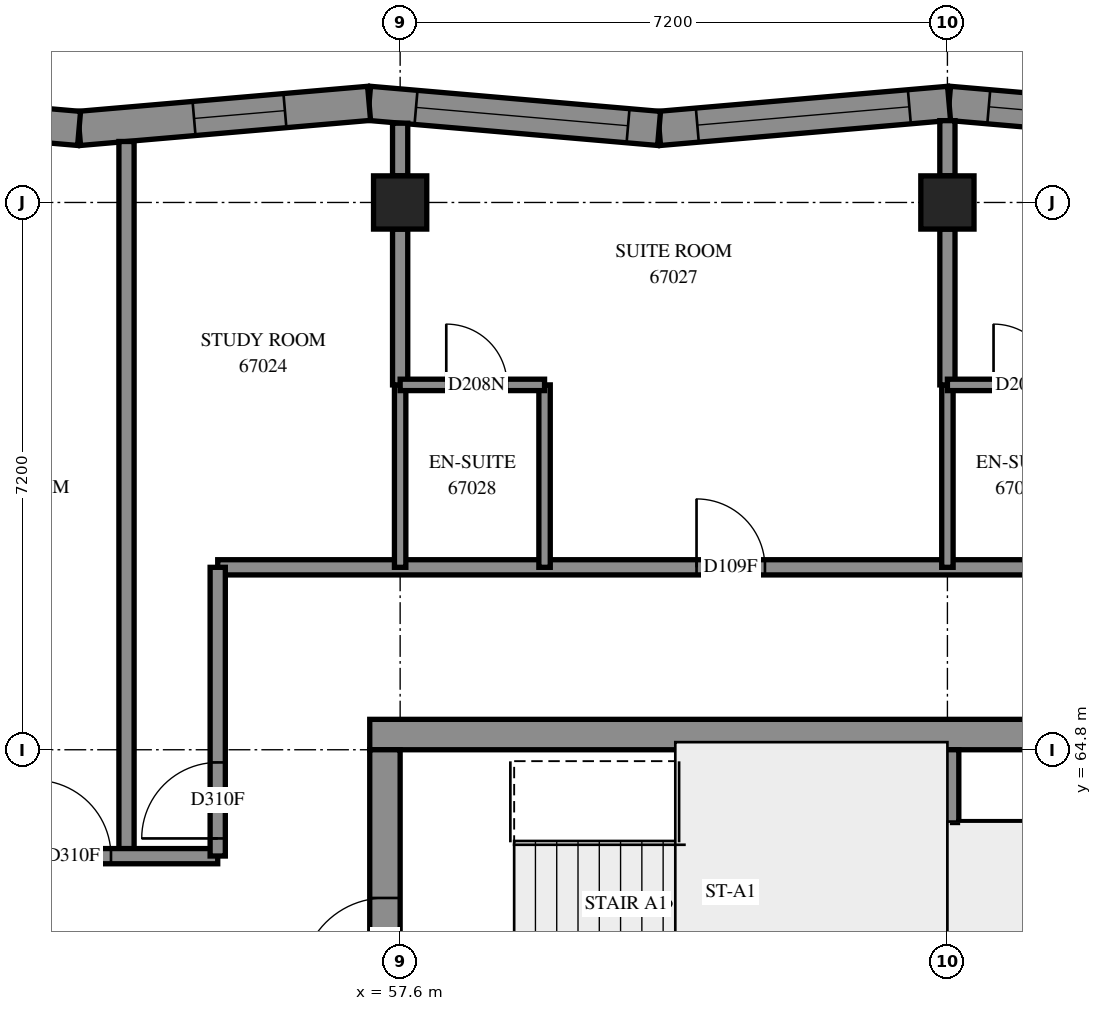
"""IFC4 building model, lengths in metres.
Left out: names, types, materials, properties, quantities, classifications, styles, units other than length and angle.
Written with IfcOpenShell. Run it as: python <this file> out.ifc"""

import sys

from ifc_helpers import new_model, si_unit, direction, frame, frame_2d, origin, origin_2d, place, context, subcontext, project, spatial, polyline, rectangle, outline, extrude, element, fill, save


model = new_model("IFC4")
c1 = context("Model", 3, precision=1e-05, world=origin(), true_north=direction((0.0, 1.0)))
c2 = subcontext(c1, "Body", "Model", "MODEL_VIEW")
j1 = project(units=[si_unit("LENGTHUNIT", "METRE"), si_unit("PLANEANGLEUNIT", "RADIAN")], contexts=[c1])
p1 = place(None, origin())
s1 = spatial("IfcSite", under=j1, at=p1, CompositionType="ELEMENT")
p2 = place(p1, origin())
s2 = spatial("IfcBuilding", under=s1, at=p2, CompositionType="ELEMENT")
p3 = place(p2, frame((0.0, 0.0, 247.2)))
s3 = spatial("IfcBuildingStorey", under=s2, at=p3, CompositionType="ELEMENT", Elevation=247.2)
for number, where, z_axis, x_axis in (
    (1, (57.6, 72.0, 0.0), (0.0, 0.0, 1.0), (1.0, 0.0, 0.0)),
    (2, (64.8, 72.0, 0.0), (0.0, 0.0, 1.0), (1.0, 0.0, 0.0)),
):
    element("IfcColumn", number, at=place(p3, frame(where, z_axis=z_axis, x_axis=x_axis)), inside=s3, PredefinedType="COLUMN", context=c2, shape_type="SweptSolid", body=[
        extrude(rectangle(XDim=0.7, YDim=0.7, at=origin_2d()), origin(), (0.0, 0.0, 1.0), 3.1),
    ])
p4 = place(p3, frame((57.2, 65.0, -0.3), z_axis=(0.0, 0.0, 1.0), x_axis=(1.0, 0.0, 0.0)))
e3 = element("IfcWall", 3, at=p4, inside=s3, PredefinedType="SHEAR", context=c2, shape_type="SweptSolid", body=[
    extrude(rectangle(XDim=15.2, YDim=0.4, at=frame_2d((7.6, 0.0))), origin(), (0.0, 0.0, 1.0), 2.7),
])
p5 = place(p4, frame((10.4, 0.0, 0.3)))
e4 = element("IfcOpeningElement", 4, at=p5, cuts=e3, PredefinedType="OPENING", context=c2, shape_type="SweptSolid", body=[
    extrude(rectangle(XDim=0.8, YDim=2.1, at=frame_2d((0.4, 1.05))), frame((0.0, 0.21, 0.0), z_axis=(0.0, -1.0, 0.0), x_axis=(1.0, 0.0, 0.0)), (0.0, 0.0, 1.0), 0.42),
])
p6 = place(p3, frame((57.4, 50.4, -0.3), z_axis=(0.0, 0.0, 1.0), x_axis=(0.0, 1.0, 0.0)))
e5 = element("IfcWall", 5, at=p6, inside=s3, PredefinedType="SHEAR", context=c2, shape_type="SweptSolid", body=[
    extrude(rectangle(XDim=14.4, YDim=0.4, at=frame_2d((7.2, 0.0))), origin(), (0.0, 0.0, 1.0), 2.7),
])
p7 = place(p6, frame((4.55, 0.0, 0.3)))
e6 = element("IfcOpeningElement", 6, at=p7, cuts=e5, PredefinedType="OPENING", context=c2, shape_type="SweptSolid", body=[
    extrude(rectangle(XDim=1.1, YDim=2.1, at=frame_2d((0.55, 1.05))), frame((0.0, 0.21, 0.0), z_axis=(0.0, -1.0, 0.0), x_axis=(1.0, 0.0, 0.0)), (0.0, 0.0, 1.0), 0.42),
])
p8 = place(p6, frame((11.35, 0.0, 0.3)))
e7 = element("IfcOpeningElement", 7, at=p8, cuts=e5, PredefinedType="OPENING", context=c2, shape_type="SweptSolid", body=[
    extrude(rectangle(XDim=1.1, YDim=2.1, at=frame_2d((0.55, 1.05))), frame((0.0, 0.21, 0.0), z_axis=(0.0, -1.0, 0.0), x_axis=(1.0, 0.0, 0.0)), (0.0, 0.0, 1.0), 0.42),
])
p9 = place(p3, frame((64.8, 60.6, 0.0), z_axis=(0.0, 0.0, 1.0), x_axis=(0.0, 1.0, 0.0)))
e8 = element("IfcWall", 8, at=p9, inside=s3, PredefinedType="SOLIDWALL", context=c2, shape_type="SweptSolid", body=[
    extrude(rectangle(XDim=4.2, YDim=0.3, at=frame_2d((2.1, 0.0))), origin(), (0.0, 0.0, 1.0), 3.1),
])
p10 = place(p3, frame((68.637, 72.974, 0.0), z_axis=(0.0, 0.0, 1.0), x_axis=(-0.9962798769, 0.0861766033, 0.0)))
e9 = element("IfcWall", 9, at=p10, inside=s3, PredefinedType="SOLIDWALL", context=c2, shape_type="SweptSolid", body=[
    extrude(outline(polyline([(0.019, -0.225), (3.849, -0.225), (3.81, 0.225), (-0.019, 0.225), (0.019, -0.225)])), origin(), (0.0, 0.0, 1.0), 3.1),
])
p11 = place(p10, frame((0.505, 0.0, 0.45)))
e10 = element("IfcOpeningElement", 10, at=p11, cuts=e9, PredefinedType="OPENING", context=c2, shape_type="SweptSolid", body=[
    extrude(rectangle(XDim=2.8, YDim=2.55, at=frame_2d((1.4, 1.275))), frame((0.0, 0.235, 0.0), z_axis=(0.0, -1.0, 0.0), x_axis=(1.0, 0.0, 0.0)), (0.0, 0.0, 1.0), 0.47),
])
p12 = place(p3, frame((64.822, 73.304, 0.0), z_axis=(0.0, 0.0, 1.0), x_axis=(-0.9962800708, -0.0861743613, 0.0)))
e11 = element("IfcWall", 11, at=p12, inside=s3, PredefinedType="SOLIDWALL", context=c2, shape_type="SweptSolid", body=[
    extrude(outline(polyline([(-0.019, -0.225), (3.81, -0.225), (3.849, 0.225), (0.019, 0.225), (-0.019, -0.225)])), origin(), (0.0, 0.0, 1.0), 3.1),
])
p13 = place(p12, frame((0.524, 0.0, 0.45)))
e12 = element("IfcOpeningElement", 12, at=p13, cuts=e11, PredefinedType="OPENING", context=c2, shape_type="SweptSolid", body=[
    extrude(rectangle(XDim=2.8, YDim=2.55, at=frame_2d((1.4, 1.275))), frame((0.0, 0.235, 0.0), z_axis=(0.0, -1.0, 0.0), x_axis=(1.0, 0.0, 0.0)), (0.0, 0.0, 1.0), 0.47),
])
p14 = place(p3, frame((61.007, 72.974, 0.0), z_axis=(0.0, 0.0, 1.0), x_axis=(-0.9962800708, 0.0861743613, 0.0)))
e13 = element("IfcWall", 13, at=p14, inside=s3, PredefinedType="SOLIDWALL", context=c2, shape_type="SweptSolid", body=[
    extrude(outline(polyline([(0.019, -0.225), (3.849, -0.225), (3.81, 0.225), (-0.019, 0.225), (0.019, -0.225)])), origin(), (0.0, 0.0, 1.0), 3.1),
])
p15 = place(p14, frame((0.41, 0.0, 0.45)))
e14 = element("IfcOpeningElement", 14, at=p15, cuts=e13, PredefinedType="OPENING", context=c2, shape_type="SweptSolid", body=[
    extrude(rectangle(XDim=2.8, YDim=2.55, at=frame_2d((1.4, 1.275))), frame((0.0, 0.235, 0.0), z_axis=(0.0, -1.0, 0.0), x_axis=(1.0, 0.0, 0.0)), (0.0, 0.0, 1.0), 0.47),
])
p16 = place(p3, frame((57.191, 73.304, 0.0), z_axis=(0.0, 0.0, 1.0), x_axis=(-0.9962798769, -0.0861766033, 0.0)))
e15 = element("IfcWall", 15, at=p16, inside=s3, PredefinedType="SOLIDWALL", context=c2, shape_type="SweptSolid", body=[
    extrude(outline(polyline([(-0.019, -0.225), (3.81, -0.225), (3.849, 0.225), (0.019, 0.225), (-0.019, -0.225)])), origin(), (0.0, 0.0, 1.0), 3.1),
])
p17 = place(p16, frame((1.111, 0.0, 0.45)))
e16 = element("IfcOpeningElement", 16, at=p17, cuts=e15, PredefinedType="OPENING", context=c2, shape_type="SweptSolid", body=[
    extrude(rectangle(XDim=1.2, YDim=2.55, at=frame_2d((0.6, 1.275))), frame((0.0, 0.235, 0.0), z_axis=(0.0, -1.0, 0.0), x_axis=(1.0, 0.0, 0.0)), (0.0, 0.0, 1.0), 0.47),
])
p18 = place(p3, frame((53.376, 72.974, 0.0), z_axis=(0.0, 0.0, 1.0), x_axis=(-0.9962800708, 0.0861743613, 0.0)))
e17 = element("IfcWall", 17, at=p18, inside=s3, PredefinedType="SOLIDWALL", context=c2, shape_type="SweptSolid", body=[
    extrude(outline(polyline([(0.019, -0.225), (3.849, -0.225), (3.81, 0.225), (-0.019, 0.225), (0.019, -0.225)])), origin(), (0.0, 0.0, 1.0), 3.1),
])
p19 = place(p18, frame((0.994, 0.0, 0.45)))
e18 = element("IfcOpeningElement", 18, at=p19, cuts=e17, PredefinedType="OPENING", context=c2, shape_type="SweptSolid", body=[
    extrude(rectangle(XDim=1.2, YDim=2.55, at=frame_2d((0.6, 1.275))), frame((0.0, 0.235, 0.0), z_axis=(0.0, -1.0, 0.0), x_axis=(1.0, 0.0, 0.0)), (0.0, 0.0, 1.0), 0.47),
])
p20 = place(p3, frame((64.95, 63.78, 0.0), z_axis=(0.0, 0.0, 1.0), x_axis=(1.0, 0.0, 0.0)))
e19 = element("IfcWall", 19, at=p20, inside=s3, PredefinedType="PARTITIONING", context=c2, shape_type="SweptSolid", body=[
    extrude(rectangle(XDim=5.95, YDim=0.15, at=frame_2d((2.975, 0.0))), origin(), (0.0, 0.0, 1.0), 3.1),
])
p21 = place(p3, frame((55.2, 67.2, 0.0), z_axis=(0.0, 0.0, 1.0), x_axis=(1.0, 0.0, 0.0)))
e20 = element("IfcWall", 20, at=p21, inside=s3, PredefinedType="PARTITIONING", context=c2, shape_type="SweptSolid", body=[
    extrude(rectangle(XDim=19.2, YDim=0.2, at=frame_2d((9.6, 0.0))), origin(), (0.0, 0.0, 1.0), 3.1),
])
p22 = place(p21, frame((6.299, 0.0, 0.0)))
e21 = element("IfcOpeningElement", 21, at=p22, cuts=e20, PredefinedType="OPENING", context=c2, shape_type="SweptSolid", body=[
    extrude(rectangle(XDim=0.9, YDim=2.1, at=frame_2d((0.45, 1.05))), frame((0.0, 0.11, 0.0), z_axis=(0.0, -1.0, 0.0), x_axis=(1.0, 0.0, 0.0)), (0.0, 0.0, 1.0), 0.22),
])
p23 = place(p21, frame((13.65, 0.0, 0.0)))
e22 = element("IfcOpeningElement", 22, at=p23, cuts=e20, PredefinedType="OPENING", context=c2, shape_type="SweptSolid", body=[
    extrude(rectangle(XDim=0.9, YDim=2.1, at=frame_2d((0.45, 1.05))), frame((0.0, 0.11, 0.0), z_axis=(0.0, -1.0, 0.0), x_axis=(1.0, 0.0, 0.0)), (0.0, 0.0, 1.0), 0.22),
])
p24 = place(p3, frame((54.0, 63.4, 0.0), z_axis=(0.0, 0.0, 1.0), x_axis=(0.0, 1.0, 0.0)))
e23 = element("IfcWall", 23, at=p24, inside=s3, PredefinedType="PARTITIONING", context=c2, shape_type="SweptSolid", body=[
    extrude(rectangle(XDim=9.402, YDim=0.2, at=frame_2d((4.701, 0.0))), origin(), (0.0, 0.0, 1.0), 3.1),
])
p25 = place(p3, frame((50.85, 63.4, 0.0), z_axis=(0.0, 0.0, 1.0), x_axis=(1.0, 0.0, 0.0)))
e24 = element("IfcWall", 24, at=p25, inside=s3, PredefinedType="PARTITIONING", context=c2, shape_type="SweptSolid", body=[
    extrude(rectangle(XDim=4.35, YDim=0.2, at=frame_2d((2.175, 0.0))), origin(), (0.0, 0.0, 1.0), 3.1),
])
p26 = place(p25, frame((1.946, 0.0, 0.0)))
e25 = element("IfcOpeningElement", 25, at=p26, cuts=e24, PredefinedType="OPENING", context=c2, shape_type="SweptSolid", body=[
    extrude(rectangle(XDim=1.0, YDim=2.1, at=frame_2d((0.5, 1.05))), frame((0.0, 0.11, 0.0), z_axis=(0.0, -1.0, 0.0), x_axis=(1.0, 0.0, 0.0)), (0.0, 0.0, 1.0), 0.22),
])
p27 = place(p3, frame((55.2, 63.402, 0.0), z_axis=(0.0, 0.0, 1.0), x_axis=(0.0, 1.0, 0.0)))
e26 = element("IfcWall", 26, at=p27, inside=s3, PredefinedType="PARTITIONING", context=c2, shape_type="SweptSolid", body=[
    extrude(rectangle(XDim=3.798, YDim=0.2, at=frame_2d((1.899, 0.0))), origin(), (0.0, 0.0, 1.0), 3.1),
])
p28 = place(p27, frame((0.231, 0.0, 0.0)))
e27 = element("IfcOpeningElement", 27, at=p28, cuts=e26, PredefinedType="OPENING", context=c2, shape_type="SweptSolid", body=[
    extrude(rectangle(XDim=1.0, YDim=2.1, at=frame_2d((0.5, 1.05))), frame((0.0, 0.11, 0.0), z_axis=(0.0, -1.0, 0.0), x_axis=(1.0, 0.0, 0.0)), (0.0, 0.0, 1.0), 0.22),
])
for number, where, z_axis, x_axis in (
    (28, (59.5, 67.2, 0.0), (0.0, 0.0, 1.0), (0.0, 1.0, 0.0)),
    (29, (57.6, 67.2, 0.0), (0.0, 0.0, 1.0), (0.0, 1.0, 0.0)),
    (30, (64.8, 67.2, 0.0), (0.0, 0.0, 1.0), (0.0, 1.0, 0.0)),
):
    element("IfcWall", number, at=place(p3, frame(where, z_axis=z_axis, x_axis=x_axis)), inside=s3, PredefinedType="PARTITIONING", context=c2, shape_type="SweptSolid", body=[
        extrude(rectangle(XDim=2.4, YDim=0.15, at=frame_2d((1.2, 0.0))), origin(), (0.0, 0.0, 1.0), 3.1),
    ])
for number, where, z_axis, x_axis in (
    (31, (57.6, 69.6, 0.0), (0.0, 0.0, 1.0), (0.0, 1.0, 0.0)),
    (32, (64.8, 69.6, 0.0), (0.0, 0.0, 1.0), (0.0, 1.0, 0.0)),
):
    element("IfcWall", number, at=place(p3, frame(where, z_axis=z_axis, x_axis=x_axis)), inside=s3, PredefinedType="PARTITIONING", context=c2, shape_type="SweptSolid", body=[
        extrude(rectangle(XDim=2.05, YDim=0.2, at=frame_2d((1.025, 0.0))), origin(), (0.0, 0.0, 1.0), 3.1),
    ])
p29 = place(p3, frame((64.8, 69.6, 0.0), z_axis=(0.0, 0.0, 1.0), x_axis=(1.0, 0.0, 0.0)))
e33 = element("IfcWall", 33, at=p29, inside=s3, PredefinedType="PARTITIONING", context=c2, shape_type="SweptSolid", body=[
    extrude(rectangle(XDim=1.9, YDim=0.15, at=frame_2d((0.95, 0.0))), origin(), (0.0, 0.0, 1.0), 3.1),
])
p30 = place(p29, frame((0.607, 0.0, 0.0)))
e34 = element("IfcOpeningElement", 34, at=p30, cuts=e33, PredefinedType="OPENING", context=c2, shape_type="SweptSolid", body=[
    extrude(rectangle(XDim=0.8, YDim=2.1, at=frame_2d((0.4, 1.05))), frame((0.0, 0.085, 0.0), z_axis=(0.0, -1.0, 0.0), x_axis=(1.0, 0.0, 0.0)), (0.0, 0.0, 1.0), 0.17),
])
p31 = place(p3, frame((57.6, 69.6, 0.0), z_axis=(0.0, 0.0, 1.0), x_axis=(1.0, 0.0, 0.0)))
e35 = element("IfcWall", 35, at=p31, inside=s3, PredefinedType="PARTITIONING", context=c2, shape_type="SweptSolid", body=[
    extrude(rectangle(XDim=1.9, YDim=0.15, at=frame_2d((0.95, 0.0))), origin(), (0.0, 0.0, 1.0), 3.1),
])
p32 = place(p31, frame((0.607, 0.0, 0.0)))
e36 = element("IfcOpeningElement", 36, at=p32, cuts=e35, PredefinedType="OPENING", context=c2, shape_type="SweptSolid", body=[
    extrude(rectangle(XDim=0.8, YDim=2.1, at=frame_2d((0.4, 1.05))), frame((0.0, 0.085, 0.0), z_axis=(0.0, -1.0, 0.0), x_axis=(1.0, 0.0, 0.0)), (0.0, 0.0, 1.0), 0.17),
])
p33 = place(p3, frame((64.8, 72.35, 0.0), z_axis=(0.0, 0.0, 1.0), x_axis=(0.0, 1.0, 0.0)))
e37 = element("IfcWall", 37, at=p33, inside=s3, PredefinedType="PARTITIONING", context=c2, shape_type="SweptSolid", body=[
    extrude(rectangle(XDim=0.726, YDim=0.2, at=frame_2d((0.363, 0.0))), origin(), (0.0, 0.0, 1.0), 3.1),
])
p34 = place(p3, frame((57.6, 72.35, 0.0), z_axis=(0.0, 0.0, 1.0), x_axis=(0.0, 1.0, 0.0)))
e38 = element("IfcWall", 38, at=p34, inside=s3, PredefinedType="PARTITIONING", context=c2, shape_type="SweptSolid", body=[
    extrude(rectangle(XDim=0.693, YDim=0.2, at=frame_2d((0.346, 0.0))), origin(), (0.0, 0.0, 1.0), 3.1),
])
p35 = place(p11, origin())
e39 = element("IfcWindow", 39, at=p35, inside=s3, PartitioningType="SINGLE_PANEL", PredefinedType="WINDOW", context=c2, shape_type="SweptSolid", body=[
    extrude(rectangle(XDim=2.8, YDim=2.55, at=frame_2d((1.4, 1.275))), frame((0.0, 0.205, 0.0), z_axis=(0.0, -1.0, 0.0), x_axis=(1.0, 0.0, 0.0)), (0.0, 0.0, 1.0), 0.06),
])
fill(e10, e39)
p36 = place(p13, origin())
e40 = element("IfcWindow", 40, at=p36, inside=s3, PartitioningType="SINGLE_PANEL", PredefinedType="WINDOW", context=c2, shape_type="SweptSolid", body=[
    extrude(rectangle(XDim=2.8, YDim=2.55, at=frame_2d((1.4, 1.275))), frame((0.0, 0.205, 0.0), z_axis=(0.0, -1.0, 0.0), x_axis=(1.0, 0.0, 0.0)), (0.0, 0.0, 1.0), 0.06),
])
fill(e12, e40)
p37 = place(p15, origin())
e41 = element("IfcWindow", 41, at=p37, inside=s3, PartitioningType="SINGLE_PANEL", PredefinedType="WINDOW", context=c2, shape_type="SweptSolid", body=[
    extrude(rectangle(XDim=2.8, YDim=2.55, at=frame_2d((1.4, 1.275))), frame((0.0, 0.205, 0.0), z_axis=(0.0, -1.0, 0.0), x_axis=(1.0, 0.0, 0.0)), (0.0, 0.0, 1.0), 0.06),
])
fill(e14, e41)
p38 = place(p17, origin())
e42 = element("IfcWindow", 42, at=p38, inside=s3, PartitioningType="SINGLE_PANEL", PredefinedType="WINDOW", context=c2, shape_type="SweptSolid", body=[
    extrude(rectangle(XDim=1.2, YDim=2.55, at=frame_2d((0.6, 1.275))), frame((0.0, 0.205, 0.0), z_axis=(0.0, -1.0, 0.0), x_axis=(1.0, 0.0, 0.0)), (0.0, 0.0, 1.0), 0.06),
])
fill(e16, e42)
p39 = place(p8, origin())
e43 = element("IfcDoor", 43, at=p39, inside=s3, OperationType="SINGLE_SWING_LEFT", PredefinedType="DOOR", context=c2, shape_type="SweptSolid", body=[
    extrude(rectangle(XDim=1.1, YDim=2.1, at=frame_2d((0.55, 1.05))), frame((0.0, 0.025, 0.0), z_axis=(0.0, -1.0, 0.0), x_axis=(1.0, 0.0, 0.0)), (0.0, 0.0, 1.0), 0.05),
])
fill(e7, e43)
p40 = place(p26, origin())
e44 = element("IfcDoor", 44, at=p40, inside=s3, OperationType="SINGLE_SWING_RIGHT", PredefinedType="DOOR", context=c2, shape_type="SweptSolid", body=[
    extrude(rectangle(XDim=1.0, YDim=2.1, at=frame_2d((0.5, 1.05))), frame((0.0, 0.025, 0.0), z_axis=(0.0, -1.0, 0.0), x_axis=(1.0, 0.0, 0.0)), (0.0, 0.0, 1.0), 0.05),
])
fill(e25, e44)
p41 = place(p28, origin())
e45 = element("IfcDoor", 45, at=p41, inside=s3, OperationType="SINGLE_SWING_LEFT", PredefinedType="DOOR", context=c2, shape_type="SweptSolid", body=[
    extrude(rectangle(XDim=1.0, YDim=2.1, at=frame_2d((0.5, 1.05))), frame((0.0, 0.025, 0.0), z_axis=(0.0, -1.0, 0.0), x_axis=(1.0, 0.0, 0.0)), (0.0, 0.0, 1.0), 0.05),
])
fill(e27, e45)
p42 = place(p22, origin())
e46 = element("IfcDoor", 46, at=p42, inside=s3, OperationType="SINGLE_SWING_RIGHT", PredefinedType="DOOR", context=c2, shape_type="SweptSolid", body=[
    extrude(rectangle(XDim=0.9, YDim=2.1, at=frame_2d((0.45, 1.05))), frame((0.0, 0.025, 0.0), z_axis=(0.0, -1.0, 0.0), x_axis=(1.0, 0.0, 0.0)), (0.0, 0.0, 1.0), 0.05),
])
fill(e21, e46)
p43 = place(p32, origin())
e47 = element("IfcDoor", 47, at=p43, inside=s3, OperationType="SINGLE_SWING_RIGHT", PredefinedType="DOOR", context=c2, shape_type="SweptSolid", body=[
    extrude(rectangle(XDim=0.8, YDim=2.1, at=frame_2d((0.4, 1.05))), frame((0.0, 0.025, 0.0), z_axis=(0.0, -1.0, 0.0), x_axis=(1.0, 0.0, 0.0)), (0.0, 0.0, 1.0), 0.05),
])
fill(e36, e47)
p44 = place(p30, origin())
e48 = element("IfcDoor", 48, at=p44, inside=s3, OperationType="SINGLE_SWING_RIGHT", PredefinedType="DOOR", context=c2, shape_type="SweptSolid", body=[
    extrude(rectangle(XDim=0.8, YDim=2.1, at=frame_2d((0.4, 1.05))), frame((0.0, 0.025, 0.0), z_axis=(0.0, -1.0, 0.0), x_axis=(1.0, 0.0, 0.0)), (0.0, 0.0, 1.0), 0.05),
])
fill(e34, e48)
save(model, sys.argv[1])
